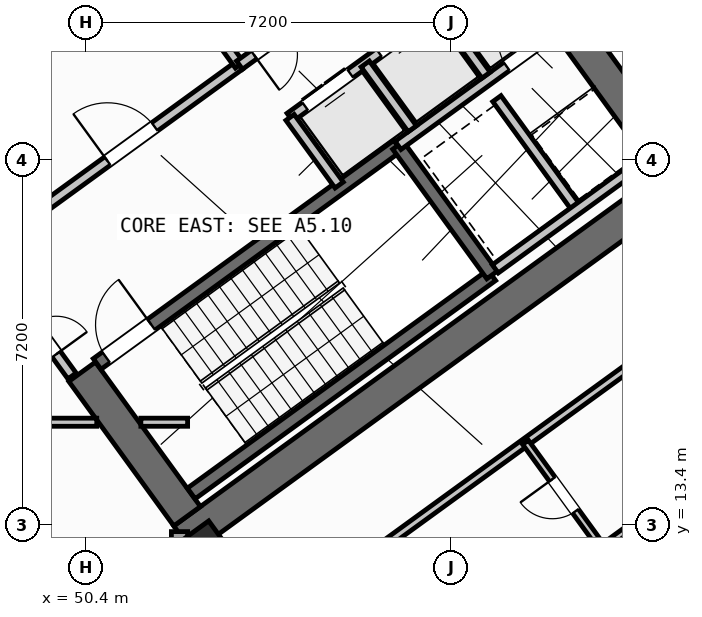
"""IFC4 building model, lengths in metres.
Left out: names, types, materials, properties, quantities, classifications, styles, units other than length and angle.
Written with IfcOpenShell. Run it as: python <this file> out.ifc"""

import sys

from ifc_helpers import new_model, si_unit, direction, frame, frame_2d, origin, origin_2d, place, context, subcontext, project, spatial, rectangle, hollow_rectangle, extrude, source, transform, mapped, element, fill, save


model = new_model("IFC4")
c1 = context("Model", 3, precision=1e-05, world=origin(), true_north=direction((0.0, 1.0)))
c2 = subcontext(c1, "Body", "Model", "MODEL_VIEW")
j1 = project(units=[si_unit("LENGTHUNIT", "METRE"), si_unit("PLANEANGLEUNIT", "RADIAN")], contexts=[c1])
p1 = place(None, origin())
s1 = spatial("IfcSite", under=j1, at=p1, CompositionType="ELEMENT")
p2 = place(p1, origin())
s2 = spatial("IfcBuilding", under=s1, at=p2, CompositionType="ELEMENT")
p3 = place(p2, frame((0.0, 0.0, 67.2)))
s3 = spatial("IfcBuildingStorey", under=s2, at=p3, CompositionType="ELEMENT", Elevation=67.2)
p4 = place(p3, frame((52.318, 13.11, 0.0), z_axis=(0.0, 0.0, 1.0), x_axis=(0.809019445368, 0.587781878776, 0.0)))
e1 = element("IfcWall", 1, at=p4, inside=s3, PredefinedType="SHEAR", context=c2, shape_type="SweptSolid", body=[
    extrude(rectangle(XDim=12.44, YDim=0.65, at=frame_2d((6.22, 0.0))), origin(), (0.0, 0.0, 1.0), 4.22),
])
p5 = place(p3, frame((52.39, 13.564, 0.0), z_axis=(0.0, 0.0, 1.0), x_axis=(-0.58779688989, 0.809008539037, 0.0)))
e2 = element("IfcWall", 2, at=p5, inside=s3, PredefinedType="SHEAR", context=c2, shape_type="SweptSolid", body=[
    extrude(rectangle(XDim=3.525, YDim=0.65, at=frame_2d((1.763, 0.0))), origin(), (0.0, 0.0, 1.0), 4.22),
])
p6 = place(p3, frame((61.929, 20.494, 0.0), z_axis=(0.0, 0.0, 1.0), x_axis=(-0.58782982593, 0.808984607855, 0.0)))
e3 = element("IfcWall", 3, at=p6, inside=s3, PredefinedType="SHEAR", context=c2, shape_type="SweptSolid", body=[
    extrude(rectangle(XDim=3.525, YDim=0.65, at=frame_2d((1.762, 0.0))), origin(), (0.0, 0.0, 1.0), 4.22),
])
m1 = source(origin(), c2, "Body", "SweptSolid", [
    extrude(hollow_rectangle(XDim=1.0, YDim=1.0, WallThickness=0.04, at=origin_2d()), origin(), (0.0, 0.0, 1.0), 4.5),
])
p7 = place(p3, frame((52.705, 12.773, 0.0), z_axis=(0.0, 0.0, 1.0), x_axis=(0.809016994375, 0.587785252292, 0.0)))
e4 = element("IfcColumn", 4, at=p7, inside=s3, PredefinedType="COLUMN", context=c2, shape_type="MappedRepresentation", body=[
    mapped(m1, transform((0.0, 0.0, 0.0), scale=1.0)),
])
p8 = place(p3, frame((58.455, 35.484, 0.0), z_axis=(0.0, 0.0, 1.0), x_axis=(0.587783625747, -0.809018176127, 0.0)))
e5 = element("IfcWall", 5, at=p8, inside=s3, PredefinedType="STANDARD", context=c2, shape_type="SweptSolid", body=[
    extrude(rectangle(XDim=21.587, YDim=0.32, at=frame_2d((10.794, 0.0))), origin(), (0.0, 0.0, 1.0), 2.395),
])
p9 = place(p8, frame((2.194, 0.0, 1.0)))
e6 = element("IfcOpeningElement", 6, at=p9, cuts=e5, PredefinedType="OPENING", context=c2, shape_type="SweptSolid", body=[
    extrude(rectangle(XDim=0.9, YDim=1.25, at=frame_2d((0.45, 0.625))), frame((0.0, 0.17, 0.0), z_axis=(0.0, -1.0, 0.0), x_axis=(1.0, 0.0, 0.0)), (0.0, 0.0, 1.0), 0.34),
])
p10 = place(p8, frame((4.994, 0.0, 1.0)))
e7 = element("IfcOpeningElement", 7, at=p10, cuts=e5, PredefinedType="OPENING", context=c2, shape_type="SweptSolid", body=[
    extrude(rectangle(XDim=0.9, YDim=1.25, at=frame_2d((0.45, 0.625))), frame((0.0, 0.17, 0.0), z_axis=(0.0, -1.0, 0.0), x_axis=(1.0, 0.0, 0.0)), (0.0, 0.0, 1.0), 0.34),
])
p11 = place(p8, frame((12.384, 0.0, 1.0)))
e8 = element("IfcOpeningElement", 8, at=p11, cuts=e5, PredefinedType="OPENING", context=c2, shape_type="SweptSolid", body=[
    extrude(rectangle(XDim=0.9, YDim=1.25, at=frame_2d((0.45, 0.625))), frame((0.0, 0.17, 0.0), z_axis=(0.0, -1.0, 0.0), x_axis=(1.0, 0.0, 0.0)), (0.0, 0.0, 1.0), 0.34),
])
p12 = place(p8, frame((18.835, 0.0, 1.0)))
e9 = element("IfcOpeningElement", 9, at=p12, cuts=e5, PredefinedType="OPENING", context=c2, shape_type="SweptSolid", body=[
    extrude(rectangle(XDim=0.9, YDim=1.25, at=frame_2d((0.45, 0.625))), frame((0.0, 0.17, 0.0), z_axis=(0.0, -1.0, 0.0), x_axis=(1.0, 0.0, 0.0)), (0.0, 0.0, 1.0), 0.34),
])
p13 = place(p3, frame((71.098, 17.731, 0.0), z_axis=(0.0, 0.0, 1.0), x_axis=(-0.809021120468, -0.587779573171, 0.0)))
e10 = element("IfcWall", 10, at=p13, inside=s3, PredefinedType="STANDARD", context=c2, shape_type="SweptSolid", body=[
    extrude(rectangle(XDim=17.588, YDim=0.32, at=frame_2d((8.794, 0.0))), origin(), (0.0, 0.0, 1.0), 4.22),
])
p14 = place(p13, frame((1.624, 0.0, 0.0)))
e11 = element("IfcOpeningElement", 11, at=p14, cuts=e10, PredefinedType="OPENING", context=c2, shape_type="SweptSolid", body=[
    extrude(rectangle(XDim=1.05, YDim=2.15, at=frame_2d((0.525, 1.075))), frame((0.0, 0.17, 0.0), z_axis=(0.0, -1.0, 0.0), x_axis=(1.0, 0.0, 0.0)), (0.0, 0.0, 1.0), 0.34),
])
p15 = place(p13, frame((4.104, 0.0, 1.0)))
e12 = element("IfcOpeningElement", 12, at=p15, cuts=e10, PredefinedType="OPENING", context=c2, shape_type="SweptSolid", body=[
    extrude(rectangle(XDim=0.9, YDim=1.25, at=frame_2d((0.45, 0.625))), frame((0.0, 0.17, 0.0), z_axis=(0.0, -1.0, 0.0), x_axis=(1.0, 0.0, 0.0)), (0.0, 0.0, 1.0), 0.34),
])
p16 = place(p13, frame((7.879, 0.0, 0.85)))
e13 = element("IfcOpeningElement", 13, at=p16, cuts=e10, PredefinedType="OPENING", context=c2, shape_type="SweptSolid", body=[
    extrude(rectangle(XDim=1.8, YDim=1.5, at=frame_2d((0.9, 0.75))), frame((0.0, 0.17, 0.0), z_axis=(0.0, -1.0, 0.0), x_axis=(1.0, 0.0, 0.0)), (0.0, 0.0, 1.0), 0.34),
])
p17 = place(p13, frame((12.849, 0.0, 0.85)))
e14 = element("IfcOpeningElement", 14, at=p17, cuts=e10, PredefinedType="OPENING", context=c2, shape_type="SweptSolid", body=[
    extrude(rectangle(XDim=1.8, YDim=1.5, at=frame_2d((0.9, 0.75))), frame((0.0, 0.17, 0.0), z_axis=(0.0, -1.0, 0.0), x_axis=(1.0, 0.0, 0.0)), (0.0, 0.0, 1.0), 0.34),
])
p18 = place(p3, frame((52.24, 13.261, 0.0), z_axis=(0.0, 0.0, 1.0), x_axis=(0.0, -1.0, 0.0)))
e15 = element("IfcWall", 15, at=p18, inside=s3, PredefinedType="STANDARD", context=c2, shape_type="SweptSolid", body=[
    extrude(rectangle(XDim=9.795, YDim=0.32, at=frame_2d((4.897, 0.0))), origin(), (0.0, 0.0, 1.0), 4.22),
])
p19 = place(p18, frame((3.058, 0.0, 0.8)))
e16 = element("IfcOpeningElement", 16, at=p19, cuts=e15, PredefinedType="OPENING", context=c2, shape_type="SweptSolid", body=[
    extrude(rectangle(XDim=2.1, YDim=1.55, at=frame_2d((1.05, 0.775))), frame((0.0, 0.17, 0.0), z_axis=(0.0, -1.0, 0.0), x_axis=(1.0, 0.0, 0.0)), (0.0, 0.0, 1.0), 0.34),
])
p20 = place(p18, frame((7.88, 0.0, 0.95)))
e17 = element("IfcOpeningElement", 17, at=p20, cuts=e15, PredefinedType="OPENING", context=c2, shape_type="SweptSolid", body=[
    extrude(rectangle(XDim=1.2, YDim=1.4, at=frame_2d((0.6, 0.7))), frame((0.0, 0.17, 0.0), z_axis=(0.0, -1.0, 0.0), x_axis=(1.0, 0.0, 0.0)), (0.0, 0.0, 1.0), 0.34),
])
p21 = place(p3, frame((52.472, 14.013, 0.0), z_axis=(0.0, 0.0, 1.0), x_axis=(0.809028366311, 0.587769599847, 0.0)))
e18 = element("IfcWall", 18, at=p21, inside=s3, PredefinedType="SHEAR", context=c2, shape_type="SweptSolid", body=[
    extrude(rectangle(XDim=7.33, YDim=0.26, at=frame_2d((3.665, 0.0))), origin(), (0.0, 0.0, 1.0), 4.22),
])
p22 = place(p3, frame((50.615, 16.57, 0.0), z_axis=(0.0, 0.0, 1.0), x_axis=(0.809028366311, 0.587769599847, 0.0)))
e19 = element("IfcWall", 19, at=p22, inside=s3, PredefinedType="SHEAR", context=c2, shape_type="SweptSolid", body=[
    extrude(rectangle(XDim=7.33, YDim=0.26, at=frame_2d((3.665, 0.0))), origin(), (0.0, 0.0, 1.0), 4.22),
])
p23 = place(p22, frame((0.22, 0.0, 0.0)))
e20 = element("IfcOpeningElement", 20, at=p23, cuts=e19, PredefinedType="OPENING", context=c2, shape_type="SweptSolid", body=[
    extrude(rectangle(XDim=1.1, YDim=2.1, at=frame_2d((0.55, 1.05))), frame((0.0, 0.14, 0.0), z_axis=(0.0, -1.0, 0.0), x_axis=(1.0, 0.0, 0.0)), (0.0, 0.0, 1.0), 0.28),
])
p24 = place(p3, frame((58.41, 18.327, 0.0), z_axis=(0.0, 0.0, 1.0), x_axis=(-0.58776738483, 0.809029975545, 0.0)))
e21 = element("IfcWall", 21, at=p24, inside=s3, PredefinedType="SHEAR", context=c2, shape_type="SweptSolid", body=[
    extrude(rectangle(XDim=3.16, YDim=0.26, at=frame_2d((1.58, 0.0))), origin(), (0.0, 0.0, 1.0), 4.22),
])
p25 = place(p3, frame((47.106, 21.437, 0.0), z_axis=(0.0, 0.0, 1.0), x_axis=(0.809012514015, 0.58779141893, 0.0)))
e22 = element("IfcWall", 22, at=p25, inside=s3, PredefinedType="STANDARD", context=c2, shape_type="SweptSolid", body=[
    extrude(rectangle(XDim=3.398, YDim=0.2, at=frame_2d((1.699, 0.0))), origin(), (0.0, 0.0, 1.0), 4.21),
])
p26 = place(p25, frame((0.408, 0.0, 0.0)))
e23 = element("IfcOpeningElement", 23, at=p26, cuts=e22, PredefinedType="OPENING", context=c2, shape_type="SweptSolid", body=[
    extrude(rectangle(XDim=1.3, YDim=2.2, at=frame_2d((0.65, 1.1))), frame((0.0, 0.11, 0.0), z_axis=(0.0, -1.0, 0.0), x_axis=(1.0, 0.0, 0.0)), (0.0, 0.0, 1.0), 0.22),
])
p27 = place(p3, frame((48.799, 19.107, 0.0), z_axis=(0.0, 0.0, 1.0), x_axis=(0.809012959416, 0.587790805897, 0.0)))
e24 = element("IfcWall", 24, at=p27, inside=s3, PredefinedType="STANDARD", context=c2, shape_type="SweptSolid", body=[
    extrude(rectangle(XDim=5.718, YDim=0.2, at=frame_2d((2.859, 0.0))), origin(), (0.0, 0.0, 1.0), 4.21),
])
p28 = place(p27, frame((2.498, 0.0, 0.0)))
e25 = element("IfcOpeningElement", 25, at=p28, cuts=e24, PredefinedType="OPENING", context=c2, shape_type="SweptSolid", body=[
    extrude(rectangle(XDim=1.15, YDim=2.1, at=frame_2d((0.575, 1.05))), frame((0.0, 0.11, 0.0), z_axis=(0.0, -1.0, 0.0), x_axis=(1.0, 0.0, 0.0)), (0.0, 0.0, 1.0), 0.22),
])
p29 = place(p3, frame((56.553, 20.884, 0.0), z_axis=(0.0, 0.0, 1.0), x_axis=(0.809035789462, 0.587759382205, 0.0)))
e26 = element("IfcWall", 26, at=p29, inside=s3, PredefinedType="STANDARD", context=c2, shape_type="SweptSolid", body=[
    extrude(rectangle(XDim=3.768, YDim=0.2, at=frame_2d((1.884, 0.0))), origin(), (0.0, 0.0, 1.0), 4.21),
])
p30 = place(p29, frame((2.65, 0.0, 0.0)))
e27 = element("IfcOpeningElement", 27, at=p30, cuts=e26, PredefinedType="OPENING", context=c2, shape_type="SweptSolid", body=[
    extrude(rectangle(XDim=0.86, YDim=2.05, at=frame_2d((0.43, 1.025))), frame((0.0, 0.11, 0.0), z_axis=(0.0, -1.0, 0.0), x_axis=(1.0, 0.0, 0.0)), (0.0, 0.0, 1.0), 0.22),
])
p31 = place(p3, frame((54.421, 21.436, 0.0), z_axis=(0.0, 0.0, 1.0), x_axis=(0.809013710463, 0.587789772183, 0.0)))
e28 = element("IfcWall", 28, at=p31, inside=s3, PredefinedType="STANDARD", context=c2, shape_type="SweptSolid", body=[
    extrude(rectangle(XDim=5.36, YDim=0.2, at=frame_2d((2.68, 0.0))), origin(), (0.0, 0.0, 1.0), 4.21),
])
p32 = place(p31, frame((0.37, 0.0, 0.0)))
e29 = element("IfcOpeningElement", 29, at=p32, cuts=e28, PredefinedType="OPENING", context=c2, shape_type="SweptSolid", body=[
    extrude(rectangle(XDim=1.1, YDim=2.15, at=frame_2d((0.55, 1.075))), frame((0.0, 0.11, 0.0), z_axis=(0.0, -1.0, 0.0), x_axis=(1.0, 0.0, 0.0)), (0.0, 0.0, 1.0), 0.22),
])
p33 = place(p31, frame((2.17, 0.0, 0.0)))
e30 = element("IfcOpeningElement", 30, at=p33, cuts=e28, PredefinedType="OPENING", context=c2, shape_type="SweptSolid", body=[
    extrude(rectangle(XDim=1.1, YDim=2.15, at=frame_2d((0.55, 1.075))), frame((0.0, 0.11, 0.0), z_axis=(0.0, -1.0, 0.0), x_axis=(1.0, 0.0, 0.0)), (0.0, 0.0, 1.0), 0.22),
])
p34 = place(p31, frame((3.97, 0.0, 0.0)))
e31 = element("IfcOpeningElement", 31, at=p34, cuts=e28, PredefinedType="OPENING", context=c2, shape_type="SweptSolid", body=[
    extrude(rectangle(XDim=1.1, YDim=2.15, at=frame_2d((0.55, 1.075))), frame((0.0, 0.11, 0.0), z_axis=(0.0, -1.0, 0.0), x_axis=(1.0, 0.0, 0.0)), (0.0, 0.0, 1.0), 0.22),
])
p35 = place(p3, frame((55.391, 20.102, 0.0), z_axis=(0.0, 0.0, 1.0), x_axis=(-0.58778447739, 0.809017557374, 0.0)))
e32 = element("IfcWall", 32, at=p35, inside=s3, PredefinedType="STANDARD", context=c2, shape_type="SweptSolid", body=[
    extrude(rectangle(XDim=1.65, YDim=0.2, at=frame_2d((0.825, 0.0))), origin(), (0.0, 0.0, 1.0), 4.21),
])
p36 = place(p3, frame((56.834, 21.212, 0.0), z_axis=(0.0, 0.0, 1.0), x_axis=(-0.58776738483, 0.809029975545, 0.0)))
e33 = element("IfcWall", 33, at=p36, inside=s3, PredefinedType="STANDARD", context=c2, shape_type="SweptSolid", body=[
    extrude(rectangle(XDim=1.58, YDim=0.2, at=frame_2d((0.79, 0.0))), origin(), (0.0, 0.0, 1.0), 4.21),
])
p37 = place(p3, frame((58.29, 22.27, 0.0), z_axis=(0.0, 0.0, 1.0), x_axis=(-0.587840865826, 0.808976585857, 0.0)))
e34 = element("IfcWall", 34, at=p37, inside=s3, PredefinedType="STANDARD", context=c2, shape_type="SweptSolid", body=[
    extrude(rectangle(XDim=1.58, YDim=0.2, at=frame_2d((0.79, 0.0))), origin(), (0.0, 0.0, 1.0), 4.21),
])
p38 = place(p3, frame((60.067, 19.655, 0.0), z_axis=(0.0, 0.0, 1.0), x_axis=(-0.587800520745, 0.809005900975, 0.0)))
e35 = element("IfcWall", 35, at=p38, inside=s3, PredefinedType="STANDARD", context=c2, shape_type="SweptSolid", body=[
    extrude(rectangle(XDim=2.66, YDim=0.2, at=frame_2d((1.33, 0.0))), origin(), (0.0, 0.0, 1.0), 4.21),
])
p39 = place(p3, frame((58.472, 18.447, 0.0), z_axis=(0.0, 0.0, 1.0), x_axis=(0.809022487728, 0.587777691266, 0.0)))
e36 = element("IfcWall", 36, at=p39, inside=s3, PredefinedType="STANDARD", context=c2, shape_type="SweptSolid", body=[
    extrude(rectangle(XDim=3.648, YDim=0.2, at=frame_2d((1.824, 0.0))), origin(), (0.0, 0.0, 1.0), 4.21),
])
p40 = place(p3, frame((53.425, 22.468, 0.0), z_axis=(0.0, 0.0, 1.0), x_axis=(-0.5877230039, 0.809062216821, 0.0)))
e37 = element("IfcWall", 37, at=p40, inside=s3, PredefinedType="STANDARD", context=c2, shape_type="SweptSolid", body=[
    extrude(rectangle(XDim=2.88, YDim=0.2, at=frame_2d((1.44, 0.0))), origin(), (0.0, 0.0, 1.0), 4.21),
])
p41 = place(p3, frame((53.425, 22.468, 0.0), z_axis=(0.0, 0.0, 1.0), x_axis=(0.80902705128, 0.587771409902, 0.0)))
e38 = element("IfcWall", 38, at=p41, inside=s3, PredefinedType="STANDARD", context=c2, shape_type="SweptSolid", body=[
    extrude(rectangle(XDim=5.368, YDim=0.2, at=frame_2d((2.684, 0.0))), origin(), (0.0, 0.0, 1.0), 4.21),
])
p42 = place(p41, frame((4.28, 0.0, 0.0)))
e39 = element("IfcOpeningElement", 39, at=p42, cuts=e38, PredefinedType="OPENING", context=c2, shape_type="SweptSolid", body=[
    extrude(rectangle(XDim=0.86, YDim=2.05, at=frame_2d((0.43, 1.025))), frame((0.0, 0.11, 0.0), z_axis=(0.0, -1.0, 0.0), x_axis=(1.0, 0.0, 0.0)), (0.0, 0.0, 1.0), 0.22),
])
p43 = place(p41, frame((0.35, 0.0, 0.0)))
e40 = element("IfcOpeningElement", 40, at=p43, cuts=e38, PredefinedType="OPENING", context=c2, shape_type="SweptSolid", body=[
    extrude(rectangle(XDim=0.86, YDim=2.05, at=frame_2d((0.43, 1.025))), frame((0.0, 0.11, 0.0), z_axis=(0.0, -1.0, 0.0), x_axis=(1.0, 0.0, 0.0)), (0.0, 0.0, 1.0), 0.22),
])
p44 = place(p3, frame((35.296, 15.42, 0.0), z_axis=(0.0, 0.0, 1.0), x_axis=(1.0, 0.0, 0.0)))
e41 = element("IfcWall", 41, at=p44, inside=s3, PredefinedType="PARTITIONING", context=c2, shape_type="SweptSolid", body=[
    extrude(rectangle(XDim=15.311, YDim=0.16, at=frame_2d((7.655, 0.0))), origin(), (0.0, 0.0, 1.0), 4.21),
])
p45 = place(p44, frame((3.176, 0.0, 0.0)))
e42 = element("IfcOpeningElement", 42, at=p45, cuts=e41, PredefinedType="OPENING", context=c2, shape_type="SweptSolid", body=[
    extrude(rectangle(XDim=1.0, YDim=2.1, at=frame_2d((0.5, 1.05))), frame((0.0, 0.09, 0.0), z_axis=(0.0, -1.0, 0.0), x_axis=(1.0, 0.0, 0.0)), (0.0, 0.0, 1.0), 0.18),
])
p46 = place(p3, frame((51.477, 15.42, 0.0), z_axis=(0.0, 0.0, 1.0), x_axis=(1.0, 0.0, 0.0)))
e43 = element("IfcWall", 43, at=p46, inside=s3, PredefinedType="PARTITIONING", context=c2, shape_type="SweptSolid", body=[
    extrude(rectangle(XDim=0.923, YDim=0.16, at=frame_2d((0.461, 0.0))), origin(), (0.0, 0.0, 1.0), 4.21),
])
p47 = place(p3, frame((50.119, 16.333, 0.0), z_axis=(0.0, 0.0, 1.0), x_axis=(-0.587749856981, 0.809042709391, 0.0)))
e44 = element("IfcWall", 44, at=p47, inside=s3, PredefinedType="STANDARD", context=c2, shape_type="SweptSolid", body=[
    extrude(rectangle(XDim=2.96, YDim=0.2, at=frame_2d((1.48, 0.0))), origin(), (0.0, 0.0, 1.0), 2.395),
])
p48 = place(p47, frame((0.53, 0.0, 0.0)))
e45 = element("IfcOpeningElement", 45, at=p48, cuts=e44, PredefinedType="OPENING", context=c2, shape_type="SweptSolid", body=[
    extrude(rectangle(XDim=1.5, YDim=2.15, at=frame_2d((0.75, 1.075))), frame((0.0, 0.11, 0.0), z_axis=(0.0, -1.0, 0.0), x_axis=(1.0, 0.0, 0.0)), (0.0, 0.0, 1.0), 0.22),
])
p49 = place(p3, frame((53.705, 11.126, 0.0), z_axis=(0.0, 0.0, 1.0), x_axis=(0.809014504436, 0.587788679384, 0.0)))
e46 = element("IfcWall", 46, at=p49, inside=s3, PredefinedType="PARTITIONING", context=c2, shape_type="SweptSolid", body=[
    extrude(rectangle(XDim=14.67, YDim=0.16, at=frame_2d((7.335, 0.0))), origin(), (0.0, 0.0, 1.0), 4.21),
])
p50 = place(p49, frame((10.2, 0.0, 0.0)))
e47 = element("IfcOpeningElement", 47, at=p50, cuts=e46, PredefinedType="OPENING", context=c2, shape_type="SweptSolid", body=[
    extrude(rectangle(XDim=1.0, YDim=2.1, at=frame_2d((0.5, 1.05))), frame((0.0, 0.09, 0.0), z_axis=(0.0, -1.0, 0.0), x_axis=(1.0, 0.0, 0.0)), (0.0, 0.0, 1.0), 0.18),
])
p51 = place(p3, frame((56.249, 9.785, 0.0), z_axis=(0.0, 0.0, 1.0), x_axis=(0.809011747655, 0.587792473715, 0.0)))
e48 = element("IfcWall", 48, at=p51, inside=s3, PredefinedType="PLUMBINGWALL", context=c2, shape_type="SweptSolid", body=[
    extrude(rectangle(XDim=13.4, YDim=0.14, at=frame_2d((6.7, 0.0))), origin(), (0.0, 0.0, 1.0), 4.21),
])
p52 = place(p51, frame((8.94, 0.0, 0.0)))
e49 = element("IfcOpeningElement", 49, at=p52, cuts=e48, PredefinedType="OPENING", context=c2, shape_type="SweptSolid", body=[
    extrude(rectangle(XDim=0.92, YDim=2.08, at=frame_2d((0.46, 1.04))), frame((0.0, 0.08, 0.0), z_axis=(0.0, -1.0, 0.0), x_axis=(1.0, 0.0, 0.0)), (0.0, 0.0, 1.0), 0.16),
])
p53 = place(p3, frame((60.585, 12.936, 0.0), z_axis=(0.0, 0.0, 1.0), x_axis=(-0.587772116736, 0.809026537752, 0.0)))
e50 = element("IfcWall", 50, at=p53, inside=s3, PredefinedType="PLUMBINGWALL", context=c2, shape_type="SweptSolid", body=[
    extrude(rectangle(XDim=2.58, YDim=0.14, at=frame_2d((1.29, 0.0))), origin(), (0.0, 0.0, 1.0), 4.21),
])
p54 = place(p53, frame((0.9, 0.0, 0.0)))
e51 = element("IfcOpeningElement", 51, at=p54, cuts=e50, PredefinedType="OPENING", context=c2, shape_type="SweptSolid", body=[
    extrude(rectangle(XDim=0.78, YDim=2.05, at=frame_2d((0.39, 1.025))), frame((0.0, 0.08, 0.0), z_axis=(0.0, -1.0, 0.0), x_axis=(1.0, 0.0, 0.0)), (0.0, 0.0, 1.0), 0.16),
])
m2 = source(origin(), c2, "Body", "SweptSolid", [
    extrude(rectangle(XDim=1.1, YDim=2.1, at=frame_2d((0.55, 1.05))), frame((0.0, 0.025, 0.0), z_axis=(0.0, -1.0, 0.0), x_axis=(1.0, 0.0, 0.0)), (0.0, 0.0, 1.0), 0.05),
])
p55 = place(p23, origin())
e52 = element("IfcDoor", 52, at=p55, inside=s3, OperationType="SINGLE_SWING_RIGHT", PredefinedType="DOOR", context=c2, shape_type="MappedRepresentation", body=[
    mapped(m2, transform((0.0, 0.0, 0.0), scale=1.0)),
])
fill(e20, e52)
m3 = source(origin(), c2, "Body", "SweptSolid", [
    extrude(rectangle(XDim=1.15, YDim=2.1, at=frame_2d((0.575, 1.05))), frame((0.0, 0.025, 0.0), z_axis=(0.0, -1.0, 0.0), x_axis=(1.0, 0.0, 0.0)), (0.0, 0.0, 1.0), 0.05),
])
p56 = place(p28, origin())
e53 = element("IfcDoor", 53, at=p56, inside=s3, OperationType="SINGLE_SWING_LEFT", PredefinedType="DOOR", context=c2, shape_type="MappedRepresentation", body=[
    mapped(m3, transform((0.0, 0.0, 0.0), scale=1.0)),
])
fill(e25, e53)
m4 = source(origin(), c2, "Body", "SweptSolid", [
    extrude(rectangle(XDim=1.1, YDim=2.15, at=frame_2d((0.55, 1.075))), frame((0.0, 0.025, 0.0), z_axis=(0.0, -1.0, 0.0), x_axis=(1.0, 0.0, 0.0)), (0.0, 0.0, 1.0), 0.05),
])
p57 = place(p32, origin())
e54 = element("IfcDoor", 54, at=p57, inside=s3, OperationType="DOUBLE_DOOR_SLIDING", PredefinedType="DOOR", context=c2, shape_type="MappedRepresentation", body=[
    mapped(m4, transform((0.0, 0.0, 0.0), scale=1.0)),
])
fill(e29, e54)
p58 = place(p33, origin())
e55 = element("IfcDoor", 55, at=p58, inside=s3, OperationType="DOUBLE_DOOR_SLIDING", PredefinedType="DOOR", context=c2, shape_type="MappedRepresentation", body=[
    mapped(m4, transform((0.0, 0.0, 0.0), scale=1.0)),
])
fill(e30, e55)
m5 = source(origin(), c2, "Body", "SweptSolid", [
    extrude(rectangle(XDim=0.86, YDim=2.05, at=frame_2d((0.43, 1.025))), frame((0.0, 0.025, 0.0), z_axis=(0.0, -1.0, 0.0), x_axis=(1.0, 0.0, 0.0)), (0.0, 0.0, 1.0), 0.05),
])
p59 = place(p30, origin())
e56 = element("IfcDoor", 56, at=p59, inside=s3, OperationType="SINGLE_SWING_RIGHT", PredefinedType="DOOR", context=c2, shape_type="MappedRepresentation", body=[
    mapped(m5, transform((0.0, 0.0, 0.0), scale=1.0)),
])
fill(e27, e56)
p60 = place(p43, frame((0.86, 0.0, 0.0), z_axis=(0.0, 0.0, 1.0), x_axis=(-1.0, 0.0, 0.0)))
e57 = element("IfcDoor", 57, at=p60, inside=s3, OperationType="SINGLE_SWING_RIGHT", PredefinedType="DOOR", context=c2, shape_type="MappedRepresentation", body=[
    mapped(m5, transform((0.0, 0.0, 0.0), scale=1.0)),
])
fill(e40, e57)
m6 = source(origin(), c2, "Body", "SweptSolid", [
    extrude(rectangle(XDim=1.5, YDim=2.15, at=frame_2d((0.75, 1.075))), frame((0.0, 0.025, 0.0), z_axis=(0.0, -1.0, 0.0), x_axis=(1.0, 0.0, 0.0)), (0.0, 0.0, 1.0), 0.05),
])
p61 = place(p48, frame((1.5, 0.0, 0.0), z_axis=(0.0, 0.0, 1.0), x_axis=(-1.0, 0.0, 0.0)))
e58 = element("IfcDoor", 58, at=p61, inside=s3, OperationType="DOUBLE_DOOR_SINGLE_SWING", PredefinedType="DOOR", context=c2, shape_type="MappedRepresentation", body=[
    mapped(m6, transform((0.0, 0.0, 0.0), scale=1.0)),
])
fill(e45, e58)
m7 = source(origin(), c2, "Body", "SweptSolid", [
    extrude(rectangle(XDim=0.78, YDim=2.05, at=frame_2d((0.39, 1.025))), frame((0.0, 0.025, 0.0), z_axis=(0.0, -1.0, 0.0), x_axis=(1.0, 0.0, 0.0)), (0.0, 0.0, 1.0), 0.05),
])
p62 = place(p54, origin())
e59 = element("IfcDoor", 59, at=p62, inside=s3, OperationType="SINGLE_SWING_RIGHT", PredefinedType="DOOR", context=c2, shape_type="MappedRepresentation", body=[
    mapped(m7, transform((0.0, 0.0, 0.0), scale=1.0)),
])
fill(e51, e59)
save(model, sys.argv[1])
